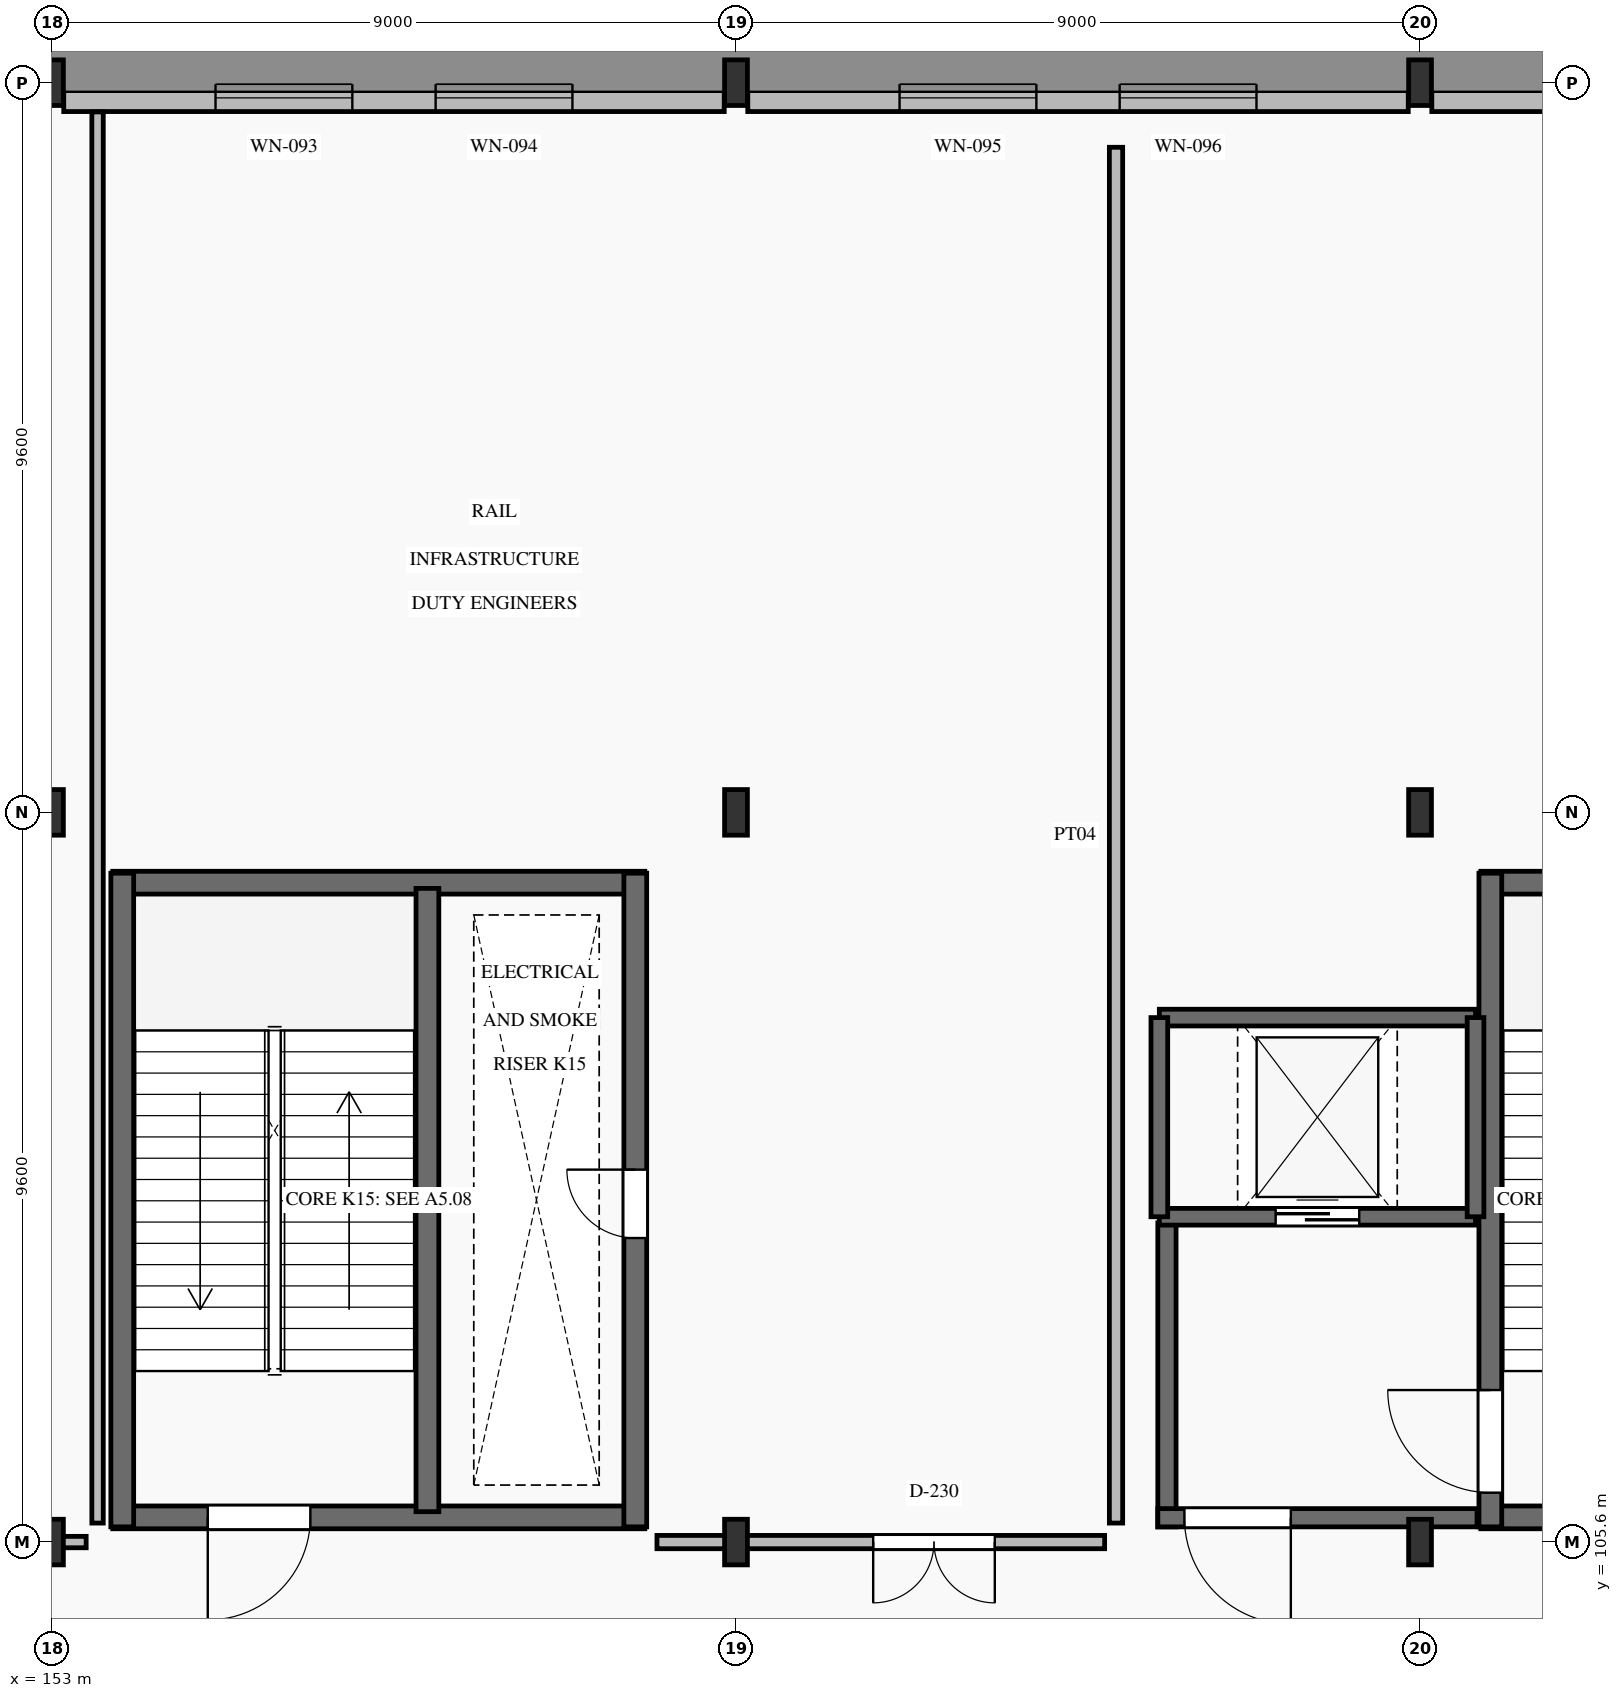
"""IFC4 building model, lengths in metres.
Left out: names, types, materials, properties, quantities, classifications, styles, units other than length and angle.
Written with IfcOpenShell. Run it as: python <this file> out.ifc"""

import sys

from ifc_helpers import new_model, si_unit, direction, frame, frame_2d, origin, origin_2d, place, context, subcontext, project, spatial, rectangle, i_section, extrude, element, fill, save


model = new_model("IFC4")
c1 = context("Model", 3, precision=1e-05, world=origin(), true_north=direction((0.0, 1.0)))
c2 = subcontext(c1, "Body", "Model", "MODEL_VIEW")
j1 = project(units=[si_unit("LENGTHUNIT", "METRE"), si_unit("PLANEANGLEUNIT", "RADIAN")], contexts=[c1])
p1 = place(None, origin())
s1 = spatial("IfcSite", under=j1, at=p1, CompositionType="ELEMENT")
p2 = place(p1, origin())
s2 = spatial("IfcBuilding", under=s1, at=p2, CompositionType="ELEMENT")
p3 = place(p2, origin())
s3 = spatial("IfcBuildingStorey", under=s2, at=p3, CompositionType="ELEMENT", Elevation=0.0)
for number, where, z_axis, x_axis in (
    (1, (153.0, 105.6, 0.0), (0.0, 0.0, 1.0), (1.0, 0.0, 0.0)),
    (2, (153.0, 115.2, 0.0), (0.0, 0.0, 1.0), (1.0, 0.0, 0.0)),
    (3, (153.0, 124.8, 0.0), (0.0, 0.0, 1.0), (1.0, 0.0, 0.0)),
    (4, (162.0, 105.6, 0.0), (0.0, 0.0, 1.0), (1.0, 0.0, 0.0)),
    (5, (162.0, 115.2, 0.0), (0.0, 0.0, 1.0), (1.0, 0.0, 0.0)),
    (6, (162.0, 124.8, 0.0), (0.0, 0.0, 1.0), (1.0, 0.0, 0.0)),
    (7, (171.0, 105.6, 0.0), (0.0, 0.0, 1.0), (1.0, 0.0, 0.0)),
    (8, (171.0, 115.2, 0.0), (0.0, 0.0, 1.0), (1.0, 0.0, 0.0)),
    (9, (171.0, 124.8, 0.0), (0.0, 0.0, 1.0), (1.0, 0.0, 0.0)),
):
    element("IfcColumn", number, at=place(p3, frame(where, z_axis=z_axis, x_axis=x_axis)), inside=s3, PredefinedType="COLUMN", context=c2, shape_type="SweptSolid", body=[
        extrude(i_section(OverallWidth=0.3, OverallDepth=0.6, WebThickness=0.015, FlangeThickness=0.03, FilletRadius=0.027, at=origin_2d()), origin(), (0.0, 0.0, 1.0), 6.0),
    ])
p4 = place(p3, frame((153.155, 124.6, 0.0), z_axis=(0.0, 0.0, 1.0), x_axis=(1.0, 0.0, 0.0)))
e10 = element("IfcWall", 10, at=p4, inside=s3, PredefinedType="SOLIDWALL", context=c2, shape_type="SweptSolid", body=[
    extrude(rectangle(XDim=8.69, YDim=0.36, at=frame_2d((4.345, 0.0))), origin(), (0.0, 0.0, 1.0), 5.49),
])
p5 = place(p4, frame((1.997, 0.0, 0.95)))
e11 = element("IfcOpeningElement", 11, at=p5, cuts=e10, PredefinedType="OPENING", context=c2, shape_type="SweptSolid", body=[
    extrude(rectangle(XDim=1.8, YDim=2.8, at=frame_2d((0.9, 1.4))), frame((0.0, 0.195, 0.0), z_axis=(0.0, -1.0, 0.0), x_axis=(1.0, 0.0, 0.0)), (0.0, 0.0, 1.0), 0.39),
])
p6 = place(p4, frame((4.893, 0.0, 0.95)))
e12 = element("IfcOpeningElement", 12, at=p6, cuts=e10, PredefinedType="OPENING", context=c2, shape_type="SweptSolid", body=[
    extrude(rectangle(XDim=1.8, YDim=2.8, at=frame_2d((0.9, 1.4))), frame((0.0, 0.195, 0.0), z_axis=(0.0, -1.0, 0.0), x_axis=(1.0, 0.0, 0.0)), (0.0, 0.0, 1.0), 0.39),
])
p7 = place(p3, frame((162.155, 124.6, 0.0), z_axis=(0.0, 0.0, 1.0), x_axis=(1.0, 0.0, 0.0)))
e13 = element("IfcWall", 13, at=p7, inside=s3, PredefinedType="SOLIDWALL", context=c2, shape_type="SweptSolid", body=[
    extrude(rectangle(XDim=8.69, YDim=0.36, at=frame_2d((4.345, 0.0))), origin(), (0.0, 0.0, 1.0), 5.49),
])
p8 = place(p7, frame((1.997, 0.0, 0.95)))
e14 = element("IfcOpeningElement", 14, at=p8, cuts=e13, PredefinedType="OPENING", context=c2, shape_type="SweptSolid", body=[
    extrude(rectangle(XDim=1.8, YDim=2.8, at=frame_2d((0.9, 1.4))), frame((0.0, 0.195, 0.0), z_axis=(0.0, -1.0, 0.0), x_axis=(1.0, 0.0, 0.0)), (0.0, 0.0, 1.0), 0.39),
])
p9 = place(p7, frame((4.893, 0.0, 0.95)))
e15 = element("IfcOpeningElement", 15, at=p9, cuts=e13, PredefinedType="OPENING", context=c2, shape_type="SweptSolid", body=[
    extrude(rectangle(XDim=1.8, YDim=2.8, at=frame_2d((0.9, 1.4))), frame((0.0, 0.195, 0.0), z_axis=(0.0, -1.0, 0.0), x_axis=(1.0, 0.0, 0.0)), (0.0, 0.0, 1.0), 0.39),
])
p10 = place(p3, frame((171.155, 124.6, 0.0), z_axis=(0.0, 0.0, 1.0), x_axis=(1.0, 0.0, 0.0)))
e16 = element("IfcWall", 16, at=p10, inside=s3, PredefinedType="SOLIDWALL", context=c2, shape_type="SweptSolid", body=[
    extrude(rectangle(XDim=8.69, YDim=0.36, at=frame_2d((4.345, 0.0))), origin(), (0.0, 0.0, 1.0), 5.49),
])
p11 = place(p10, frame((1.997, 0.0, 0.95)))
e17 = element("IfcOpeningElement", 17, at=p11, cuts=e16, PredefinedType="OPENING", context=c2, shape_type="SweptSolid", body=[
    extrude(rectangle(XDim=1.8, YDim=2.8, at=frame_2d((0.9, 1.4))), frame((0.0, 0.195, 0.0), z_axis=(0.0, -1.0, 0.0), x_axis=(1.0, 0.0, 0.0)), (0.0, 0.0, 1.0), 0.39),
])
p12 = place(p10, frame((4.893, 0.0, 0.95)))
e18 = element("IfcOpeningElement", 18, at=p12, cuts=e16, PredefinedType="OPENING", context=c2, shape_type="SweptSolid", body=[
    extrude(rectangle(XDim=1.8, YDim=2.8, at=frame_2d((0.9, 1.4))), frame((0.0, 0.195, 0.0), z_axis=(0.0, -1.0, 0.0), x_axis=(1.0, 0.0, 0.0)), (0.0, 0.0, 1.0), 0.39),
])
for number, where, z_axis, x_axis in (
    (19, (171.8, 105.925, 0.0), (0.0, 0.0, 1.0), (1.0, 0.0, 0.0)),
    (20, (171.8, 114.275, 0.0), (0.0, 0.0, 1.0), (1.0, 0.0, 0.0)),
):
    element("IfcWall", number, at=place(p3, frame(where, z_axis=z_axis, x_axis=x_axis)), inside=s3, PredefinedType="SHEAR", context=c2, shape_type="SweptSolid", body=[
        extrude(rectangle(XDim=7.0, YDim=0.3, at=frame_2d((3.5, 0.0))), origin(), (0.0, 0.0, 1.0), 6.0),
    ])
p13 = place(p3, frame((171.925, 105.8, 0.0), z_axis=(0.0, 0.0, 1.0), x_axis=(0.0, 1.0, 0.0)))
e21 = element("IfcWall", 21, at=p13, inside=s3, PredefinedType="SHEAR", context=c2, shape_type="SweptSolid", body=[
    extrude(rectangle(XDim=8.6, YDim=0.3, at=frame_2d((4.3, 0.0))), origin(), (0.0, 0.0, 1.0), 6.0),
])
p14 = place(p13, frame((0.45, 0.0, 0.0)))
e22 = element("IfcOpeningElement", 22, at=p14, cuts=e21, PredefinedType="OPENING", context=c2, shape_type="SweptSolid", body=[
    extrude(rectangle(XDim=1.35, YDim=2.2, at=frame_2d((0.675, 1.1))), frame((0.0, 0.165, 0.0), z_axis=(0.0, -1.0, 0.0), x_axis=(1.0, 0.0, 0.0)), (0.0, 0.0, 1.0), 0.33),
])
p15 = place(p3, frame((167.67, 105.8, 0.0), z_axis=(0.0, 0.0, 1.0), x_axis=(0.0, 1.0, 0.0)))
e23 = element("IfcWall", 23, at=p15, inside=s3, PredefinedType="SHEAR", context=c2, shape_type="SweptSolid", body=[
    extrude(rectangle(XDim=4.0, YDim=0.24, at=frame_2d((2.0, 0.0))), origin(), (0.0, 0.0, 1.0), 6.0),
])
p16 = place(p3, frame((167.55, 105.92, 0.0), z_axis=(0.0, 0.0, 1.0), x_axis=(1.0, 0.0, 0.0)))
e24 = element("IfcWall", 24, at=p16, inside=s3, PredefinedType="SHEAR", context=c2, shape_type="SweptSolid", body=[
    extrude(rectangle(XDim=4.2, YDim=0.24, at=frame_2d((2.1, 0.0))), origin(), (0.0, 0.0, 1.0), 6.0),
])
p17 = place(p16, frame((0.35, 0.0, 0.0)))
e25 = element("IfcOpeningElement", 25, at=p17, cuts=e24, PredefinedType="OPENING", context=c2, shape_type="SweptSolid", body=[
    extrude(rectangle(XDim=1.4, YDim=2.2, at=frame_2d((0.7, 1.1))), frame((0.0, 0.135, 0.0), z_axis=(0.0, -1.0, 0.0), x_axis=(1.0, 0.0, 0.0)), (0.0, 0.0, 1.0), 0.27),
])
p18 = place(p3, frame((153.8, 105.925, 0.0), z_axis=(0.0, 0.0, 1.0), x_axis=(1.0, 0.0, 0.0)))
e26 = element("IfcWall", 26, at=p18, inside=s3, PredefinedType="SHEAR", context=c2, shape_type="SweptSolid", body=[
    extrude(rectangle(XDim=7.0, YDim=0.3, at=frame_2d((3.5, 0.0))), origin(), (0.0, 0.0, 1.0), 6.0),
])
p19 = place(p18, frame((1.25, 0.0, 0.0)))
e27 = element("IfcOpeningElement", 27, at=p19, cuts=e26, PredefinedType="OPENING", context=c2, shape_type="SweptSolid", body=[
    extrude(rectangle(XDim=1.35, YDim=2.2, at=frame_2d((0.675, 1.1))), frame((0.0, 0.165, 0.0), z_axis=(0.0, -1.0, 0.0), x_axis=(1.0, 0.0, 0.0)), (0.0, 0.0, 1.0), 0.33),
])
p20 = place(p3, frame((153.8, 114.275, 0.0), z_axis=(0.0, 0.0, 1.0), x_axis=(1.0, 0.0, 0.0)))
e28 = element("IfcWall", 28, at=p20, inside=s3, PredefinedType="SHEAR", context=c2, shape_type="SweptSolid", body=[
    extrude(rectangle(XDim=7.0, YDim=0.3, at=frame_2d((3.5, 0.0))), origin(), (0.0, 0.0, 1.0), 6.0),
])
p21 = place(p3, frame((153.925, 105.8, 0.0), z_axis=(0.0, 0.0, 1.0), x_axis=(0.0, 1.0, 0.0)))
e29 = element("IfcWall", 29, at=p21, inside=s3, PredefinedType="SHEAR", context=c2, shape_type="SweptSolid", body=[
    extrude(rectangle(XDim=8.6, YDim=0.3, at=frame_2d((4.3, 0.0))), origin(), (0.0, 0.0, 1.0), 6.0),
])
p22 = place(p3, frame((160.675, 105.8, 0.0), z_axis=(0.0, 0.0, 1.0), x_axis=(0.0, 1.0, 0.0)))
e30 = element("IfcWall", 30, at=p22, inside=s3, PredefinedType="SHEAR", context=c2, shape_type="SweptSolid", body=[
    extrude(rectangle(XDim=8.6, YDim=0.3, at=frame_2d((4.3, 0.0))), origin(), (0.0, 0.0, 1.0), 6.0),
])
p23 = place(p22, frame((3.8, 0.0, 0.0)))
e31 = element("IfcOpeningElement", 31, at=p23, cuts=e30, PredefinedType="OPENING", context=c2, shape_type="SweptSolid", body=[
    extrude(rectangle(XDim=0.9, YDim=2.05, at=frame_2d((0.45, 1.025))), frame((0.0, 0.165, 0.0), z_axis=(0.0, -1.0, 0.0), x_axis=(1.0, 0.0, 0.0)), (0.0, 0.0, 1.0), 0.33),
])
p24 = place(p3, frame((157.94, 106.0, 0.0), z_axis=(0.0, 0.0, 1.0), x_axis=(0.0, 1.0, 0.0)))
e32 = element("IfcWall", 32, at=p24, inside=s3, PredefinedType="SHEAR", context=c2, shape_type="SweptSolid", body=[
    extrude(rectangle(XDim=8.2, YDim=0.3, at=frame_2d((4.1, 0.0))), origin(), (0.0, 0.0, 1.0), 6.0),
])
p25 = place(p3, frame((167.57, 109.88, 0.0), z_axis=(0.0, 0.0, 1.0), x_axis=(1.0, 0.0, 0.0)))
e33 = element("IfcWall", 33, at=p25, inside=s3, PredefinedType="SHEAR", context=c2, shape_type="SweptSolid", body=[
    extrude(rectangle(XDim=4.16, YDim=0.22, at=frame_2d((2.08, 0.0))), origin(), (0.0, 0.0, 1.0), 6.0),
])
p26 = place(p25, frame((1.53, 0.0, 0.0)))
e34 = element("IfcOpeningElement", 34, at=p26, cuts=e33, PredefinedType="OPENING", context=c2, shape_type="SweptSolid", body=[
    extrude(rectangle(XDim=1.1, YDim=2.15, at=frame_2d((0.55, 1.075))), frame((0.0, 0.125, 0.0), z_axis=(0.0, -1.0, 0.0), x_axis=(1.0, 0.0, 0.0)), (0.0, 0.0, 1.0), 0.25),
])
p27 = place(p3, frame((167.57, 112.5, 0.0), z_axis=(0.0, 0.0, 1.0), x_axis=(1.0, 0.0, 0.0)))
e35 = element("IfcWall", 35, at=p27, inside=s3, PredefinedType="SHEAR", context=c2, shape_type="SweptSolid", body=[
    extrude(rectangle(XDim=4.16, YDim=0.22, at=frame_2d((2.08, 0.0))), origin(), (0.0, 0.0, 1.0), 6.0),
])
for number, where, z_axis, x_axis in (
    (36, (167.57, 109.88, 0.0), (0.0, 0.0, 1.0), (0.0, 1.0, 0.0)),
    (37, (171.73, 109.88, 0.0), (0.0, 0.0, 1.0), (0.0, 1.0, 0.0)),
):
    element("IfcWall", number, at=place(p3, frame(where, z_axis=z_axis, x_axis=x_axis)), inside=s3, PredefinedType="SHEAR", context=c2, shape_type="SweptSolid", body=[
        extrude(rectangle(XDim=2.62, YDim=0.22, at=frame_2d((1.31, 0.0))), origin(), (0.0, 0.0, 1.0), 6.0),
    ])
p28 = place(p3, frame((139.15, 105.6, 0.0), z_axis=(0.0, 0.0, 1.0), x_axis=(1.0, 0.0, 0.0)))
e38 = element("IfcWall", 38, at=p28, inside=s3, PredefinedType="PARTITIONING", context=c2, shape_type="SweptSolid", body=[
    extrude(rectangle(XDim=14.3, YDim=0.15, at=frame_2d((7.15, 0.0))), origin(), (0.0, 0.0, 1.0), 5.37),
])
p29 = place(p28, frame((7.05, 0.0, 0.0)))
e39 = element("IfcOpeningElement", 39, at=p29, cuts=e38, PredefinedType="OPENING", context=c2, shape_type="SweptSolid", body=[
    extrude(rectangle(XDim=1.6, YDim=2.25, at=frame_2d((0.8, 1.125))), frame((0.0, 0.09, 0.0), z_axis=(0.0, -1.0, 0.0), x_axis=(1.0, 0.0, 0.0)), (0.0, 0.0, 1.0), 0.18),
])
p30 = place(p3, frame((160.96, 105.6, 0.0), z_axis=(0.0, 0.0, 1.0), x_axis=(1.0, 0.0, 0.0)))
e40 = element("IfcWall", 40, at=p30, inside=s3, PredefinedType="PARTITIONING", context=c2, shape_type="SweptSolid", body=[
    extrude(rectangle(XDim=5.89, YDim=0.175, at=frame_2d((2.945, 0.0))), origin(), (0.0, 0.0, 1.0), 5.37),
])
p31 = place(p30, frame((2.845, 0.0, 0.0)))
e41 = element("IfcOpeningElement", 41, at=p31, cuts=e40, PredefinedType="OPENING", context=c2, shape_type="SweptSolid", body=[
    extrude(rectangle(XDim=1.6, YDim=2.25, at=frame_2d((0.8, 1.125))), frame((0.0, 0.103, 0.0), z_axis=(0.0, -1.0, 0.0), x_axis=(1.0, 0.0, 0.0)), (0.0, 0.0, 1.0), 0.205),
])
p32 = place(p3, frame((153.6, 105.85, 0.0), z_axis=(0.0, 0.0, 1.0), x_axis=(0.0, 1.0, 0.0)))
e42 = element("IfcWall", 42, at=p32, inside=s3, PredefinedType="PARTITIONING", context=c2, shape_type="SweptSolid", body=[
    extrude(rectangle(XDim=18.565, YDim=0.15, at=frame_2d((9.282, 0.0))), origin(), (0.0, 0.0, 1.0), 5.72),
])
p33 = place(p3, frame((167.0, 105.85, 0.0), z_axis=(0.0, 0.0, 1.0), x_axis=(0.0, 1.0, 0.0)))
e43 = element("IfcWall", 43, at=p33, inside=s3, PredefinedType="PARTITIONING", context=c2, shape_type="SweptSolid", body=[
    extrude(rectangle(XDim=18.1, YDim=0.175, at=frame_2d((9.05, 0.0))), origin(), (0.0, 0.0, 1.0), 5.72),
])
p34 = place(p5, origin())
e44 = element("IfcWindow", 44, at=p34, inside=s3, PartitioningType="SINGLE_PANEL", PredefinedType="WINDOW", context=c2, shape_type="SweptSolid", body=[
    extrude(rectangle(XDim=1.8, YDim=2.8, at=frame_2d((0.9, 1.4))), frame((0.0, 0.03, 0.0), z_axis=(0.0, -1.0, 0.0), x_axis=(1.0, 0.0, 0.0)), (0.0, 0.0, 1.0), 0.06),
])
fill(e11, e44)
p35 = place(p6, origin())
e45 = element("IfcWindow", 45, at=p35, inside=s3, PartitioningType="SINGLE_PANEL", PredefinedType="WINDOW", context=c2, shape_type="SweptSolid", body=[
    extrude(rectangle(XDim=1.8, YDim=2.8, at=frame_2d((0.9, 1.4))), frame((0.0, 0.03, 0.0), z_axis=(0.0, -1.0, 0.0), x_axis=(1.0, 0.0, 0.0)), (0.0, 0.0, 1.0), 0.06),
])
fill(e12, e45)
p36 = place(p8, origin())
e46 = element("IfcWindow", 46, at=p36, inside=s3, PartitioningType="SINGLE_PANEL", PredefinedType="WINDOW", context=c2, shape_type="SweptSolid", body=[
    extrude(rectangle(XDim=1.8, YDim=2.8, at=frame_2d((0.9, 1.4))), frame((0.0, 0.03, 0.0), z_axis=(0.0, -1.0, 0.0), x_axis=(1.0, 0.0, 0.0)), (0.0, 0.0, 1.0), 0.06),
])
fill(e14, e46)
p37 = place(p9, origin())
e47 = element("IfcWindow", 47, at=p37, inside=s3, PartitioningType="SINGLE_PANEL", PredefinedType="WINDOW", context=c2, shape_type="SweptSolid", body=[
    extrude(rectangle(XDim=1.8, YDim=2.8, at=frame_2d((0.9, 1.4))), frame((0.0, 0.03, 0.0), z_axis=(0.0, -1.0, 0.0), x_axis=(1.0, 0.0, 0.0)), (0.0, 0.0, 1.0), 0.06),
])
fill(e15, e47)
p38 = place(p14, origin())
e48 = element("IfcDoor", 48, at=p38, inside=s3, OperationType="SINGLE_SWING_RIGHT", PredefinedType="DOOR", context=c2, shape_type="SweptSolid", body=[
    extrude(rectangle(XDim=1.35, YDim=2.2, at=frame_2d((0.675, 1.1))), frame((0.0, 0.025, 0.0), z_axis=(0.0, -1.0, 0.0), x_axis=(1.0, 0.0, 0.0)), (0.0, 0.0, 1.0), 0.05),
])
fill(e22, e48)
p39 = place(p17, frame((1.4, 0.0, 0.0), z_axis=(0.0, 0.0, 1.0), x_axis=(-1.0, 0.0, 0.0)))
e49 = element("IfcDoor", 49, at=p39, inside=s3, OperationType="SINGLE_SWING_RIGHT", PredefinedType="DOOR", context=c2, shape_type="SweptSolid", body=[
    extrude(rectangle(XDim=1.4, YDim=2.2, at=frame_2d((0.7, 1.1))), frame((0.0, 0.025, 0.0), z_axis=(0.0, -1.0, 0.0), x_axis=(1.0, 0.0, 0.0)), (0.0, 0.0, 1.0), 0.05),
])
fill(e25, e49)
p40 = place(p19, frame((1.35, 0.0, 0.0), z_axis=(0.0, 0.0, 1.0), x_axis=(-1.0, 0.0, 0.0)))
e50 = element("IfcDoor", 50, at=p40, inside=s3, OperationType="SINGLE_SWING_LEFT", PredefinedType="DOOR", context=c2, shape_type="SweptSolid", body=[
    extrude(rectangle(XDim=1.35, YDim=2.2, at=frame_2d((0.675, 1.1))), frame((0.0, 0.025, 0.0), z_axis=(0.0, -1.0, 0.0), x_axis=(1.0, 0.0, 0.0)), (0.0, 0.0, 1.0), 0.05),
])
fill(e27, e50)
p41 = place(p23, origin())
e51 = element("IfcDoor", 51, at=p41, inside=s3, OperationType="SINGLE_SWING_RIGHT", PredefinedType="DOOR", context=c2, shape_type="SweptSolid", body=[
    extrude(rectangle(XDim=0.9, YDim=2.05, at=frame_2d((0.45, 1.025))), frame((0.0, 0.025, 0.0), z_axis=(0.0, -1.0, 0.0), x_axis=(1.0, 0.0, 0.0)), (0.0, 0.0, 1.0), 0.05),
])
fill(e31, e51)
p42 = place(p26, origin())
e52 = element("IfcDoor", 52, at=p42, inside=s3, OperationType="SLIDING_TO_LEFT", PredefinedType="DOOR", context=c2, shape_type="SweptSolid", body=[
    extrude(rectangle(XDim=1.1, YDim=2.15, at=frame_2d((0.55, 1.075))), frame((0.0, 0.025, 0.0), z_axis=(0.0, -1.0, 0.0), x_axis=(1.0, 0.0, 0.0)), (0.0, 0.0, 1.0), 0.05),
])
fill(e34, e52)
p43 = place(p31, frame((1.6, 0.0, 0.0), z_axis=(0.0, 0.0, 1.0), x_axis=(-1.0, 0.0, 0.0)))
e53 = element("IfcDoor", 53, at=p43, inside=s3, OperationType="DOUBLE_DOOR_SINGLE_SWING", PredefinedType="DOOR", context=c2, shape_type="SweptSolid", body=[
    extrude(rectangle(XDim=1.6, YDim=2.25, at=frame_2d((0.8, 1.125))), frame((0.0, 0.025, 0.0), z_axis=(0.0, -1.0, 0.0), x_axis=(1.0, 0.0, 0.0)), (0.0, 0.0, 1.0), 0.05),
])
fill(e41, e53)
save(model, sys.argv[1])
